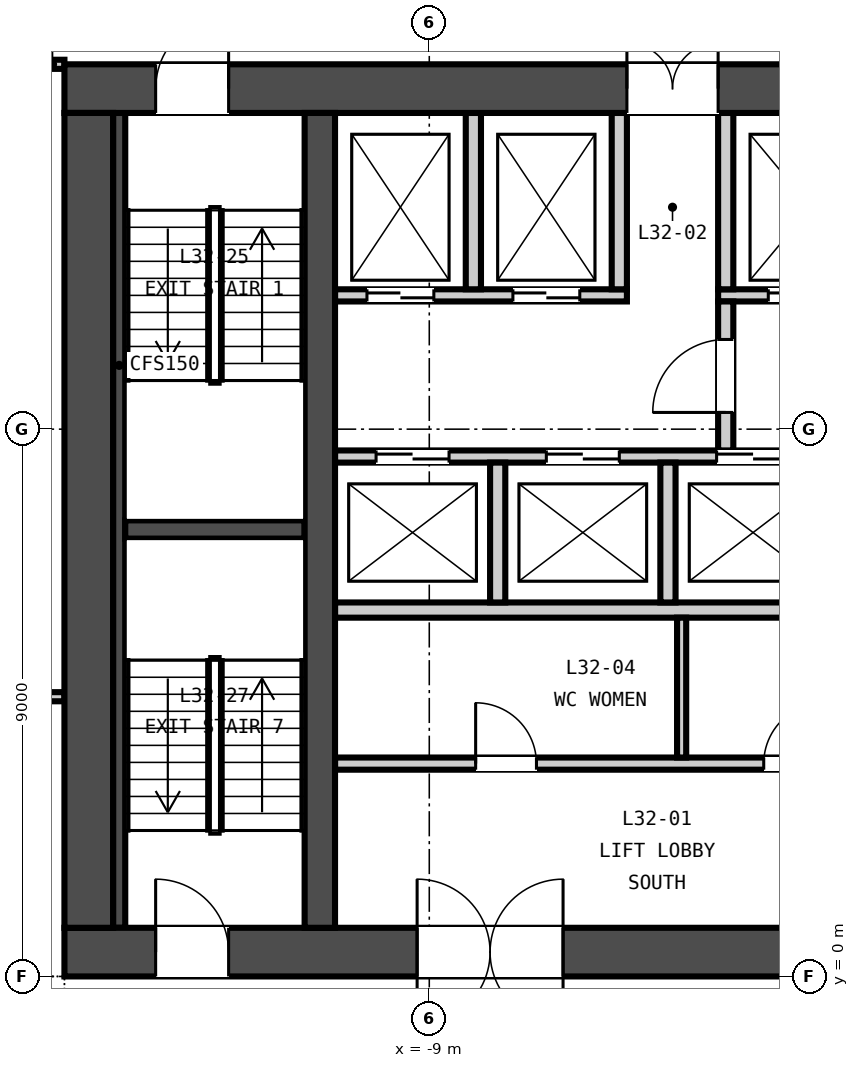
"""IFC4 building model, lengths in metres.
Left out: names, types, materials, properties, quantities, classifications, styles, units other than length and angle.
Written with IfcOpenShell. Run it as: python <this file> out.ifc"""

import sys

from ifc_helpers import new_model, si_unit, direction, frame, frame_2d, origin, place, context, subcontext, project, spatial, rectangle, extrude, element, fill, save


model = new_model("IFC4")
c1 = context("Model", 3, precision=1e-05, world=origin(), true_north=direction((0.0, 1.0)))
c2 = subcontext(c1, "Body", "Model", "MODEL_VIEW")
j1 = project(units=[si_unit("LENGTHUNIT", "METRE"), si_unit("PLANEANGLEUNIT", "RADIAN")], contexts=[c1])
p1 = place(None, origin())
s1 = spatial("IfcSite", under=j1, at=p1, CompositionType="ELEMENT")
p2 = place(p1, origin())
s2 = spatial("IfcBuilding", under=s1, at=p2, CompositionType="ELEMENT")
p3 = place(p2, frame((0.0, 0.0, 133.45)))
s3 = spatial("IfcBuildingStorey", under=s2, at=p3, CompositionType="ELEMENT", Elevation=133.45)
p4 = place(p3, frame((-15.0, 0.4, -0.15), z_axis=(0.0, 0.0, 1.0), x_axis=(1.0, 0.0, 0.0)))
e1 = element("IfcWall", 1, at=p4, inside=s3, PredefinedType="SOLIDWALL", context=c2, shape_type="SweptSolid", body=[
    extrude(rectangle(XDim=30.0, YDim=0.8, at=frame_2d((15.0, 0.0))), origin(), (0.0, 0.0, 1.0), 3.65),
])
p5 = place(p4, frame((5.8, 0.0, 0.15)))
e2 = element("IfcOpeningElement", 2, at=p5, cuts=e1, PredefinedType="OPENING", context=c2, shape_type="SweptSolid", body=[
    extrude(rectangle(XDim=2.4, YDim=2.4, at=frame_2d((1.2, 1.2))), frame((0.0, 0.41, 0.0), z_axis=(0.0, -1.0, 0.0), x_axis=(1.0, 0.0, 0.0)), (0.0, 0.0, 1.0), 0.82),
])
p6 = place(p4, frame((13.8, 0.0, 0.15)))
e3 = element("IfcOpeningElement", 3, at=p6, cuts=e1, PredefinedType="OPENING", context=c2, shape_type="SweptSolid", body=[
    extrude(rectangle(XDim=2.4, YDim=2.4, at=frame_2d((1.2, 1.2))), frame((0.0, 0.41, 0.0), z_axis=(0.0, -1.0, 0.0), x_axis=(1.0, 0.0, 0.0)), (0.0, 0.0, 1.0), 0.82),
])
p7 = place(p4, frame((21.8, 0.0, 0.15)))
e4 = element("IfcOpeningElement", 4, at=p7, cuts=e1, PredefinedType="OPENING", context=c2, shape_type="SweptSolid", body=[
    extrude(rectangle(XDim=2.4, YDim=2.4, at=frame_2d((1.2, 1.2))), frame((0.0, 0.41, 0.0), z_axis=(0.0, -1.0, 0.0), x_axis=(1.0, 0.0, 0.0)), (0.0, 0.0, 1.0), 0.82),
])
p8 = place(p4, frame((1.5, 0.0, 0.15)))
e5 = element("IfcOpeningElement", 5, at=p8, cuts=e1, PredefinedType="OPENING", context=c2, shape_type="SweptSolid", body=[
    extrude(rectangle(XDim=1.2, YDim=2.1, at=frame_2d((0.6, 1.05))), frame((0.0, 0.41, 0.0), z_axis=(0.0, -1.0, 0.0), x_axis=(1.0, 0.0, 0.0)), (0.0, 0.0, 1.0), 0.82),
])
p9 = place(p4, frame((27.3, 0.0, 0.15)))
e6 = element("IfcOpeningElement", 6, at=p9, cuts=e1, PredefinedType="OPENING", context=c2, shape_type="SweptSolid", body=[
    extrude(rectangle(XDim=1.2, YDim=2.1, at=frame_2d((0.6, 1.05))), frame((0.0, 0.41, 0.0), z_axis=(0.0, -1.0, 0.0), x_axis=(1.0, 0.0, 0.0)), (0.0, 0.0, 1.0), 0.82),
])
p10 = place(p3, frame((-15.0, 14.6, -0.15), z_axis=(0.0, 0.0, 1.0), x_axis=(1.0, 0.0, 0.0)))
e7 = element("IfcWall", 7, at=p10, inside=s3, PredefinedType="SOLIDWALL", context=c2, shape_type="SweptSolid", body=[
    extrude(rectangle(XDim=30.0, YDim=0.8, at=frame_2d((15.0, 0.0))), origin(), (0.0, 0.0, 1.0), 3.65),
])
p11 = place(p10, frame((9.25, 0.0, 0.15)))
e8 = element("IfcOpeningElement", 8, at=p11, cuts=e7, PredefinedType="OPENING", context=c2, shape_type="SweptSolid", body=[
    extrude(rectangle(XDim=1.5, YDim=2.1, at=frame_2d((0.75, 1.05))), frame((0.0, 0.41, 0.0), z_axis=(0.0, -1.0, 0.0), x_axis=(1.0, 0.0, 0.0)), (0.0, 0.0, 1.0), 0.82),
])
p12 = place(p10, frame((19.4, 0.0, 0.15)))
e9 = element("IfcOpeningElement", 9, at=p12, cuts=e7, PredefinedType="OPENING", context=c2, shape_type="SweptSolid", body=[
    extrude(rectangle(XDim=1.5, YDim=2.1, at=frame_2d((0.75, 1.05))), frame((0.0, 0.41, 0.0), z_axis=(0.0, -1.0, 0.0), x_axis=(1.0, 0.0, 0.0)), (0.0, 0.0, 1.0), 0.82),
])
p13 = place(p10, frame((1.5, 0.0, 0.15)))
e10 = element("IfcOpeningElement", 10, at=p13, cuts=e7, PredefinedType="OPENING", context=c2, shape_type="SweptSolid", body=[
    extrude(rectangle(XDim=1.2, YDim=2.1, at=frame_2d((0.6, 1.05))), frame((0.0, 0.41, 0.0), z_axis=(0.0, -1.0, 0.0), x_axis=(1.0, 0.0, 0.0)), (0.0, 0.0, 1.0), 0.82),
])
p14 = place(p10, frame((27.3, 0.0, 0.15)))
e11 = element("IfcOpeningElement", 11, at=p14, cuts=e7, PredefinedType="OPENING", context=c2, shape_type="SweptSolid", body=[
    extrude(rectangle(XDim=1.2, YDim=2.1, at=frame_2d((0.6, 1.05))), frame((0.0, 0.41, 0.0), z_axis=(0.0, -1.0, 0.0), x_axis=(1.0, 0.0, 0.0)), (0.0, 0.0, 1.0), 0.82),
])
p15 = place(p3, frame((-14.6, 0.8, -0.15), z_axis=(0.0, 0.0, 1.0), x_axis=(0.0, 1.0, 0.0)))
e12 = element("IfcWall", 12, at=p15, inside=s3, PredefinedType="SOLIDWALL", context=c2, shape_type="SweptSolid", body=[
    extrude(rectangle(XDim=13.4, YDim=0.8, at=frame_2d((6.7, 0.0))), origin(), (0.0, 0.0, 1.0), 3.65),
])
p16 = place(p3, frame((-10.8, 0.8, -0.15), z_axis=(0.0, 0.0, 1.0), x_axis=(0.0, 1.0, 0.0)))
e13 = element("IfcWall", 13, at=p16, inside=s3, PredefinedType="SOLIDWALL", context=c2, shape_type="SweptSolid", body=[
    extrude(rectangle(XDim=13.4, YDim=0.5, at=frame_2d((6.7, 0.0))), origin(), (0.0, 0.0, 1.0), 3.65),
])
p17 = place(p3, frame((-10.55, 3.5, 0.0), z_axis=(0.0, 0.0, 1.0), x_axis=(1.0, 0.0, 0.0)))
e14 = element("IfcWall", 14, at=p17, inside=s3, PredefinedType="PARTITIONING", context=c2, shape_type="SweptSolid", body=[
    extrude(rectangle(XDim=21.1, YDim=0.2, at=frame_2d((10.55, 0.0))), origin(), (0.0, 0.0, 1.0), 3.5),
])
p18 = place(p17, frame((2.312, 0.0, 0.0)))
e15 = element("IfcOpeningElement", 15, at=p18, cuts=e14, PredefinedType="OPENING", context=c2, shape_type="SweptSolid", body=[
    extrude(rectangle(XDim=1.0, YDim=2.1, at=frame_2d((0.5, 1.05))), frame((0.0, 0.11, 0.0), z_axis=(0.0, -1.0, 0.0), x_axis=(1.0, 0.0, 0.0)), (0.0, 0.0, 1.0), 0.22),
])
p19 = place(p17, frame((7.05, 0.0, 0.0)))
e16 = element("IfcOpeningElement", 16, at=p19, cuts=e14, PredefinedType="OPENING", context=c2, shape_type="SweptSolid", body=[
    extrude(rectangle(XDim=1.0, YDim=2.1, at=frame_2d((0.5, 1.05))), frame((0.0, 0.11, 0.0), z_axis=(0.0, -1.0, 0.0), x_axis=(1.0, 0.0, 0.0)), (0.0, 0.0, 1.0), 0.22),
])
p20 = place(p17, frame((10.175, 0.0, 0.0)))
e17 = element("IfcOpeningElement", 17, at=p20, cuts=e14, PredefinedType="OPENING", context=c2, shape_type="SweptSolid", body=[
    extrude(rectangle(XDim=1.0, YDim=2.1, at=frame_2d((0.5, 1.05))), frame((0.0, 0.11, 0.0), z_axis=(0.0, -1.0, 0.0), x_axis=(1.0, 0.0, 0.0)), (0.0, 0.0, 1.0), 0.22),
])
p21 = place(p17, frame((14.05, 0.0, 0.0)))
e18 = element("IfcOpeningElement", 18, at=p21, cuts=e14, PredefinedType="OPENING", context=c2, shape_type="SweptSolid", body=[
    extrude(rectangle(XDim=1.0, YDim=2.1, at=frame_2d((0.5, 1.05))), frame((0.0, 0.11, 0.0), z_axis=(0.0, -1.0, 0.0), x_axis=(1.0, 0.0, 0.0)), (0.0, 0.0, 1.0), 0.22),
])
p22 = place(p17, frame((17.837, 0.0, 0.0)))
e19 = element("IfcOpeningElement", 19, at=p22, cuts=e14, PredefinedType="OPENING", context=c2, shape_type="SweptSolid", body=[
    extrude(rectangle(XDim=0.9, YDim=2.1, at=frame_2d((0.45, 1.05))), frame((0.0, 0.11, 0.0), z_axis=(0.0, -1.0, 0.0), x_axis=(1.0, 0.0, 0.0)), (0.0, 0.0, 1.0), 0.22),
])
p23 = place(p17, frame((19.9, 0.0, 0.0)))
e20 = element("IfcOpeningElement", 20, at=p23, cuts=e14, PredefinedType="OPENING", context=c2, shape_type="SweptSolid", body=[
    extrude(rectangle(XDim=0.9, YDim=2.1, at=frame_2d((0.45, 1.05))), frame((0.0, 0.11, 0.0), z_axis=(0.0, -1.0, 0.0), x_axis=(1.0, 0.0, 0.0)), (0.0, 0.0, 1.0), 0.22),
])
p24 = place(p3, frame((-10.55, 6.025, 0.0), z_axis=(0.0, 0.0, 1.0), x_axis=(1.0, 0.0, 0.0)))
e21 = element("IfcWall", 21, at=p24, inside=s3, PredefinedType="PARTITIONING", context=c2, shape_type="SweptSolid", body=[
    extrude(rectangle(XDim=21.1, YDim=0.25, at=frame_2d((10.55, 0.0))), origin(), (0.0, 0.0, 1.0), 3.5),
])
p25 = place(p3, frame((-10.55, 8.55, 0.0), z_axis=(0.0, 0.0, 1.0), x_axis=(1.0, 0.0, 0.0)))
e22 = element("IfcWall", 22, at=p25, inside=s3, PredefinedType="PARTITIONING", context=c2, shape_type="SweptSolid", body=[
    extrude(rectangle(XDim=21.1, YDim=0.2, at=frame_2d((10.55, 0.0))), origin(), (0.0, 0.0, 1.0), 3.5),
])
p26 = place(p25, frame((0.675, 0.0, 0.0)))
e23 = element("IfcOpeningElement", 23, at=p26, cuts=e22, PredefinedType="OPENING", context=c2, shape_type="SweptSolid", body=[
    extrude(rectangle(XDim=1.2, YDim=2.1, at=frame_2d((0.6, 1.05))), frame((0.0, 0.11, 0.0), z_axis=(0.0, -1.0, 0.0), x_axis=(1.0, 0.0, 0.0)), (0.0, 0.0, 1.0), 0.22),
])
p27 = place(p25, frame((3.475, 0.0, 0.0)))
e24 = element("IfcOpeningElement", 24, at=p27, cuts=e22, PredefinedType="OPENING", context=c2, shape_type="SweptSolid", body=[
    extrude(rectangle(XDim=1.2, YDim=2.1, at=frame_2d((0.6, 1.05))), frame((0.0, 0.11, 0.0), z_axis=(0.0, -1.0, 0.0), x_axis=(1.0, 0.0, 0.0)), (0.0, 0.0, 1.0), 0.22),
])
p28 = place(p25, frame((6.275, 0.0, 0.0)))
e25 = element("IfcOpeningElement", 25, at=p28, cuts=e22, PredefinedType="OPENING", context=c2, shape_type="SweptSolid", body=[
    extrude(rectangle(XDim=1.2, YDim=2.1, at=frame_2d((0.6, 1.05))), frame((0.0, 0.11, 0.0), z_axis=(0.0, -1.0, 0.0), x_axis=(1.0, 0.0, 0.0)), (0.0, 0.0, 1.0), 0.22),
])
p29 = place(p25, frame((9.075, 0.0, 0.0)))
e26 = element("IfcOpeningElement", 26, at=p29, cuts=e22, PredefinedType="OPENING", context=c2, shape_type="SweptSolid", body=[
    extrude(rectangle(XDim=1.2, YDim=2.1, at=frame_2d((0.6, 1.05))), frame((0.0, 0.11, 0.0), z_axis=(0.0, -1.0, 0.0), x_axis=(1.0, 0.0, 0.0)), (0.0, 0.0, 1.0), 0.22),
])
p30 = place(p25, frame((11.875, 0.0, 0.0)))
e27 = element("IfcOpeningElement", 27, at=p30, cuts=e22, PredefinedType="OPENING", context=c2, shape_type="SweptSolid", body=[
    extrude(rectangle(XDim=1.2, YDim=2.1, at=frame_2d((0.6, 1.05))), frame((0.0, 0.11, 0.0), z_axis=(0.0, -1.0, 0.0), x_axis=(1.0, 0.0, 0.0)), (0.0, 0.0, 1.0), 0.22),
])
p31 = place(p25, frame((14.675, 0.0, 0.0)))
e28 = element("IfcOpeningElement", 28, at=p31, cuts=e22, PredefinedType="OPENING", context=c2, shape_type="SweptSolid", body=[
    extrude(rectangle(XDim=1.2, YDim=2.1, at=frame_2d((0.6, 1.05))), frame((0.0, 0.11, 0.0), z_axis=(0.0, -1.0, 0.0), x_axis=(1.0, 0.0, 0.0)), (0.0, 0.0, 1.0), 0.22),
])
p32 = place(p25, frame((17.475, 0.0, 0.0)))
e29 = element("IfcOpeningElement", 29, at=p32, cuts=e22, PredefinedType="OPENING", context=c2, shape_type="SweptSolid", body=[
    extrude(rectangle(XDim=1.2, YDim=2.1, at=frame_2d((0.6, 1.05))), frame((0.0, 0.11, 0.0), z_axis=(0.0, -1.0, 0.0), x_axis=(1.0, 0.0, 0.0)), (0.0, 0.0, 1.0), 0.22),
])
p33 = place(p25, frame((19.9, 0.0, 0.0)))
e30 = element("IfcOpeningElement", 30, at=p33, cuts=e22, PredefinedType="OPENING", context=c2, shape_type="SweptSolid", body=[
    extrude(rectangle(XDim=0.9, YDim=2.1, at=frame_2d((0.45, 1.05))), frame((0.0, 0.11, 0.0), z_axis=(0.0, -1.0, 0.0), x_axis=(1.0, 0.0, 0.0)), (0.0, 0.0, 1.0), 0.22),
])
p34 = place(p3, frame((-10.55, 11.2, 0.0), z_axis=(0.0, 0.0, 1.0), x_axis=(1.0, 0.0, 0.0)))
e31 = element("IfcWall", 31, at=p34, inside=s3, PredefinedType="PARTITIONING", context=c2, shape_type="SweptSolid", body=[
    extrude(rectangle(XDim=4.8, YDim=0.2, at=frame_2d((2.4, 0.0))), origin(), (0.0, 0.0, 1.0), 3.5),
])
p35 = place(p34, frame((0.525, 0.0, 0.0)))
e32 = element("IfcOpeningElement", 32, at=p35, cuts=e31, PredefinedType="OPENING", context=c2, shape_type="SweptSolid", body=[
    extrude(rectangle(XDim=1.1, YDim=2.1, at=frame_2d((0.55, 1.05))), frame((0.0, 0.11, 0.0), z_axis=(0.0, -1.0, 0.0), x_axis=(1.0, 0.0, 0.0)), (0.0, 0.0, 1.0), 0.22),
])
p36 = place(p34, frame((2.925, 0.0, 0.0)))
e33 = element("IfcOpeningElement", 33, at=p36, cuts=e31, PredefinedType="OPENING", context=c2, shape_type="SweptSolid", body=[
    extrude(rectangle(XDim=1.1, YDim=2.1, at=frame_2d((0.55, 1.05))), frame((0.0, 0.11, 0.0), z_axis=(0.0, -1.0, 0.0), x_axis=(1.0, 0.0, 0.0)), (0.0, 0.0, 1.0), 0.22),
])
p37 = place(p3, frame((-4.25, 11.2, 0.0), z_axis=(0.0, 0.0, 1.0), x_axis=(1.0, 0.0, 0.0)))
e34 = element("IfcWall", 34, at=p37, inside=s3, PredefinedType="PARTITIONING", context=c2, shape_type="SweptSolid", body=[
    extrude(rectangle(XDim=8.65, YDim=0.2, at=frame_2d((4.325, 0.0))), origin(), (0.0, 0.0, 1.0), 3.5),
])
p38 = place(p37, frame((0.825, 0.0, 0.0)))
e35 = element("IfcOpeningElement", 35, at=p38, cuts=e34, PredefinedType="OPENING", context=c2, shape_type="SweptSolid", body=[
    extrude(rectangle(XDim=1.4, YDim=2.1, at=frame_2d((0.7, 1.05))), frame((0.0, 0.11, 0.0), z_axis=(0.0, -1.0, 0.0), x_axis=(1.0, 0.0, 0.0)), (0.0, 0.0, 1.0), 0.22),
])
p39 = place(p37, frame((3.625, 0.0, 0.0)))
e36 = element("IfcOpeningElement", 36, at=p39, cuts=e34, PredefinedType="OPENING", context=c2, shape_type="SweptSolid", body=[
    extrude(rectangle(XDim=1.4, YDim=2.1, at=frame_2d((0.7, 1.05))), frame((0.0, 0.11, 0.0), z_axis=(0.0, -1.0, 0.0), x_axis=(1.0, 0.0, 0.0)), (0.0, 0.0, 1.0), 0.22),
])
p40 = place(p3, frame((-4.125, 8.65, 0.0), z_axis=(0.0, 0.0, 1.0), x_axis=(0.0, 1.0, 0.0)))
e37 = element("IfcWall", 37, at=p40, inside=s3, PredefinedType="PARTITIONING", context=c2, shape_type="SweptSolid", body=[
    extrude(rectangle(XDim=2.45, YDim=0.25, at=frame_2d((1.225, 0.0))), origin(), (0.0, 0.0, 1.0), 3.5),
])
p41 = place(p40, frame((0.625, 0.0, 0.0)))
e38 = element("IfcOpeningElement", 38, at=p41, cuts=e37, PredefinedType="OPENING", context=c2, shape_type="SweptSolid", body=[
    extrude(rectangle(XDim=1.2, YDim=2.1, at=frame_2d((0.6, 1.05))), frame((0.0, 0.135, 0.0), z_axis=(0.0, -1.0, 0.0), x_axis=(1.0, 0.0, 0.0)), (0.0, 0.0, 1.0), 0.27),
])
p42 = place(p3, frame((-4.85, 3.6, 0.0), z_axis=(0.0, 0.0, 1.0), x_axis=(0.0, 1.0, 0.0)))
e39 = element("IfcWall", 39, at=p42, inside=s3, PredefinedType="PARTITIONING", context=c2, shape_type="SweptSolid", body=[
    extrude(rectangle(XDim=2.3, YDim=0.15, at=frame_2d((1.15, 0.0))), origin(), (0.0, 0.0, 1.0), 3.5),
])
for number, where, z_axis, x_axis in (
    (40, (-7.875, 6.15, 0.0), (0.0, 0.0, 1.0), (0.0, 1.0, 0.0)),
    (41, (-5.075, 6.15, 0.0), (0.0, 0.0, 1.0), (0.0, 1.0, 0.0)),
):
    element("IfcWall", number, at=place(p3, frame(where, z_axis=z_axis, x_axis=x_axis)), inside=s3, PredefinedType="PARTITIONING", context=c2, shape_type="SweptSolid", body=[
        extrude(rectangle(XDim=2.3, YDim=0.25, at=frame_2d((1.15, 0.0))), origin(), (0.0, 0.0, 1.0), 3.5),
    ])
for number, where, z_axis, x_axis in (
    (42, (-8.275, 11.3, 0.0), (0.0, 0.0, 1.0), (0.0, 1.0, 0.0)),
    (43, (-5.875, 11.3, 0.0), (0.0, 0.0, 1.0), (0.0, 1.0, 0.0)),
    (44, (-4.125, 11.3, 0.0), (0.0, 0.0, 1.0), (0.0, 1.0, 0.0)),
):
    element("IfcWall", number, at=place(p3, frame(where, z_axis=z_axis, x_axis=x_axis)), inside=s3, PredefinedType="PARTITIONING", context=c2, shape_type="SweptSolid", body=[
        extrude(rectangle(XDim=2.9, YDim=0.25, at=frame_2d((1.45, 0.0))), origin(), (0.0, 0.0, 1.0), 3.5),
    ])
p43 = place(p3, frame((-14.0, 7.35, 0.0), z_axis=(0.0, 0.0, 1.0), x_axis=(1.0, 0.0, 0.0)))
e45 = element("IfcWall", 45, at=p43, inside=s3, PredefinedType="SOLIDWALL", context=c2, shape_type="SweptSolid", body=[
    extrude(rectangle(XDim=2.95, YDim=0.3, at=frame_2d((1.475, 0.0))), origin(), (0.0, 0.0, 1.0), 3.5),
])
p44 = place(p3, frame((-14.1, 0.8, 0.0), z_axis=(0.0, 0.0, 1.0), x_axis=(0.0, 1.0, 0.0)))
e46 = element("IfcWall", 46, at=p44, inside=s3, PredefinedType="SOLIDWALL", context=c2, shape_type="SweptSolid", body=[
    extrude(rectangle(XDim=13.4, YDim=0.2, at=frame_2d((6.7, 0.0))), origin(), (0.0, 0.0, 1.0), 3.5),
])
p45 = place(p3, frame((-15.0, 15.0, 0.0), z_axis=(0.0, 0.0, 1.0), x_axis=(-1.0, 0.0, 0.0)))
e47 = element("IfcWall", 47, at=p45, inside=s3, PredefinedType="PARTITIONING", context=c2, shape_type="SweptSolid", body=[
    extrude(rectangle(XDim=0.401, YDim=0.15, at=frame_2d((0.2, 0.0))), origin(), (0.0, 0.0, 1.0), 2.741),
])
p46 = place(p3, frame((-19.5, 4.6, 0.0), z_axis=(0.0, 0.0, 1.0), x_axis=(1.0, 0.0, 0.0)))
e48 = element("IfcWall", 48, at=p46, inside=s3, PredefinedType="PARTITIONING", context=c2, shape_type="SweptSolid", body=[
    extrude(rectangle(XDim=4.5, YDim=0.15, at=frame_2d((2.25, 0.0))), origin(), (0.0, 0.0, 1.0), 2.741),
])
p47 = place(p41, origin())
e49 = element("IfcDoor", 49, at=p47, inside=s3, OperationType="SINGLE_SWING_LEFT", PredefinedType="DOOR", context=c2, shape_type="SweptSolid", body=[
    extrude(rectangle(XDim=1.2, YDim=2.1, at=frame_2d((0.6, 1.05))), frame((0.0, 0.025, 0.0), z_axis=(0.0, -1.0, 0.0), x_axis=(1.0, 0.0, 0.0)), (0.0, 0.0, 1.0), 0.05),
])
fill(e38, e49)
p48 = place(p18, origin())
e50 = element("IfcDoor", 50, at=p48, inside=s3, OperationType="SINGLE_SWING_LEFT", PredefinedType="DOOR", context=c2, shape_type="SweptSolid", body=[
    extrude(rectangle(XDim=1.0, YDim=2.1, at=frame_2d((0.5, 1.05))), frame((0.0, 0.025, 0.0), z_axis=(0.0, -1.0, 0.0), x_axis=(1.0, 0.0, 0.0)), (0.0, 0.0, 1.0), 0.05),
])
fill(e15, e50)
p49 = place(p19, origin())
e51 = element("IfcDoor", 51, at=p49, inside=s3, OperationType="SINGLE_SWING_RIGHT", PredefinedType="DOOR", context=c2, shape_type="SweptSolid", body=[
    extrude(rectangle(XDim=1.0, YDim=2.1, at=frame_2d((0.5, 1.05))), frame((0.0, 0.025, 0.0), z_axis=(0.0, -1.0, 0.0), x_axis=(1.0, 0.0, 0.0)), (0.0, 0.0, 1.0), 0.05),
])
fill(e16, e51)
p50 = place(p26, origin())
e52 = element("IfcDoor", 52, at=p50, inside=s3, OperationType="DOUBLE_DOOR_SLIDING", PredefinedType="DOOR", context=c2, shape_type="SweptSolid", body=[
    extrude(rectangle(XDim=1.2, YDim=2.1, at=frame_2d((0.6, 1.05))), frame((0.0, 0.025, 0.0), z_axis=(0.0, -1.0, 0.0), x_axis=(1.0, 0.0, 0.0)), (0.0, 0.0, 1.0), 0.05),
])
fill(e23, e52)
p51 = place(p27, origin())
e53 = element("IfcDoor", 53, at=p51, inside=s3, OperationType="DOUBLE_DOOR_SLIDING", PredefinedType="DOOR", context=c2, shape_type="SweptSolid", body=[
    extrude(rectangle(XDim=1.2, YDim=2.1, at=frame_2d((0.6, 1.05))), frame((0.0, 0.025, 0.0), z_axis=(0.0, -1.0, 0.0), x_axis=(1.0, 0.0, 0.0)), (0.0, 0.0, 1.0), 0.05),
])
fill(e24, e53)
p52 = place(p28, origin())
e54 = element("IfcDoor", 54, at=p52, inside=s3, OperationType="DOUBLE_DOOR_SLIDING", PredefinedType="DOOR", context=c2, shape_type="SweptSolid", body=[
    extrude(rectangle(XDim=1.2, YDim=2.1, at=frame_2d((0.6, 1.05))), frame((0.0, 0.025, 0.0), z_axis=(0.0, -1.0, 0.0), x_axis=(1.0, 0.0, 0.0)), (0.0, 0.0, 1.0), 0.05),
])
fill(e25, e54)
p53 = place(p35, origin())
e55 = element("IfcDoor", 55, at=p53, inside=s3, OperationType="DOUBLE_DOOR_SLIDING", PredefinedType="DOOR", context=c2, shape_type="SweptSolid", body=[
    extrude(rectangle(XDim=1.1, YDim=2.1, at=frame_2d((0.55, 1.05))), frame((0.0, 0.025, 0.0), z_axis=(0.0, -1.0, 0.0), x_axis=(1.0, 0.0, 0.0)), (0.0, 0.0, 1.0), 0.05),
])
fill(e32, e55)
p54 = place(p36, origin())
e56 = element("IfcDoor", 56, at=p54, inside=s3, OperationType="DOUBLE_DOOR_SLIDING", PredefinedType="DOOR", context=c2, shape_type="SweptSolid", body=[
    extrude(rectangle(XDim=1.1, YDim=2.1, at=frame_2d((0.55, 1.05))), frame((0.0, 0.025, 0.0), z_axis=(0.0, -1.0, 0.0), x_axis=(1.0, 0.0, 0.0)), (0.0, 0.0, 1.0), 0.05),
])
fill(e33, e56)
p55 = place(p38, origin())
e57 = element("IfcDoor", 57, at=p55, inside=s3, OperationType="DOUBLE_DOOR_SLIDING", PredefinedType="DOOR", context=c2, shape_type="SweptSolid", body=[
    extrude(rectangle(XDim=1.4, YDim=2.1, at=frame_2d((0.7, 1.05))), frame((0.0, 0.025, 0.0), z_axis=(0.0, -1.0, 0.0), x_axis=(1.0, 0.0, 0.0)), (0.0, 0.0, 1.0), 0.05),
])
fill(e35, e57)
p56 = place(p5, origin())
e58 = element("IfcDoor", 58, at=p56, inside=s3, OperationType="DOUBLE_DOOR_DOUBLE_SWING", PredefinedType="DOOR", context=c2, shape_type="SweptSolid", body=[
    extrude(rectangle(XDim=2.4, YDim=2.4, at=frame_2d((1.2, 1.2))), frame((0.0, 0.025, 0.0), z_axis=(0.0, -1.0, 0.0), x_axis=(1.0, 0.0, 0.0)), (0.0, 0.0, 1.0), 0.05),
])
fill(e2, e58)
p57 = place(p11, origin())
e59 = element("IfcDoor", 59, at=p57, inside=s3, OperationType="DOUBLE_DOOR_SINGLE_SWING", PredefinedType="DOOR", context=c2, shape_type="SweptSolid", body=[
    extrude(rectangle(XDim=1.5, YDim=2.1, at=frame_2d((0.75, 1.05))), frame((0.0, 0.025, 0.0), z_axis=(0.0, -1.0, 0.0), x_axis=(1.0, 0.0, 0.0)), (0.0, 0.0, 1.0), 0.05),
])
fill(e8, e59)
p58 = place(p13, origin())
e60 = element("IfcDoor", 60, at=p58, inside=s3, OperationType="SINGLE_SWING_RIGHT", PredefinedType="DOOR", context=c2, shape_type="SweptSolid", body=[
    extrude(rectangle(XDim=1.2, YDim=2.1, at=frame_2d((0.6, 1.05))), frame((0.0, 0.025, 0.0), z_axis=(0.0, -1.0, 0.0), x_axis=(1.0, 0.0, 0.0)), (0.0, 0.0, 1.0), 0.05),
])
fill(e10, e60)
p59 = place(p8, origin())
e61 = element("IfcDoor", 61, at=p59, inside=s3, OperationType="SINGLE_SWING_LEFT", PredefinedType="DOOR", context=c2, shape_type="SweptSolid", body=[
    extrude(rectangle(XDim=1.2, YDim=2.1, at=frame_2d((0.6, 1.05))), frame((0.0, 0.025, 0.0), z_axis=(0.0, -1.0, 0.0), x_axis=(1.0, 0.0, 0.0)), (0.0, 0.0, 1.0), 0.05),
])
fill(e5, e61)
save(model, sys.argv[1])
